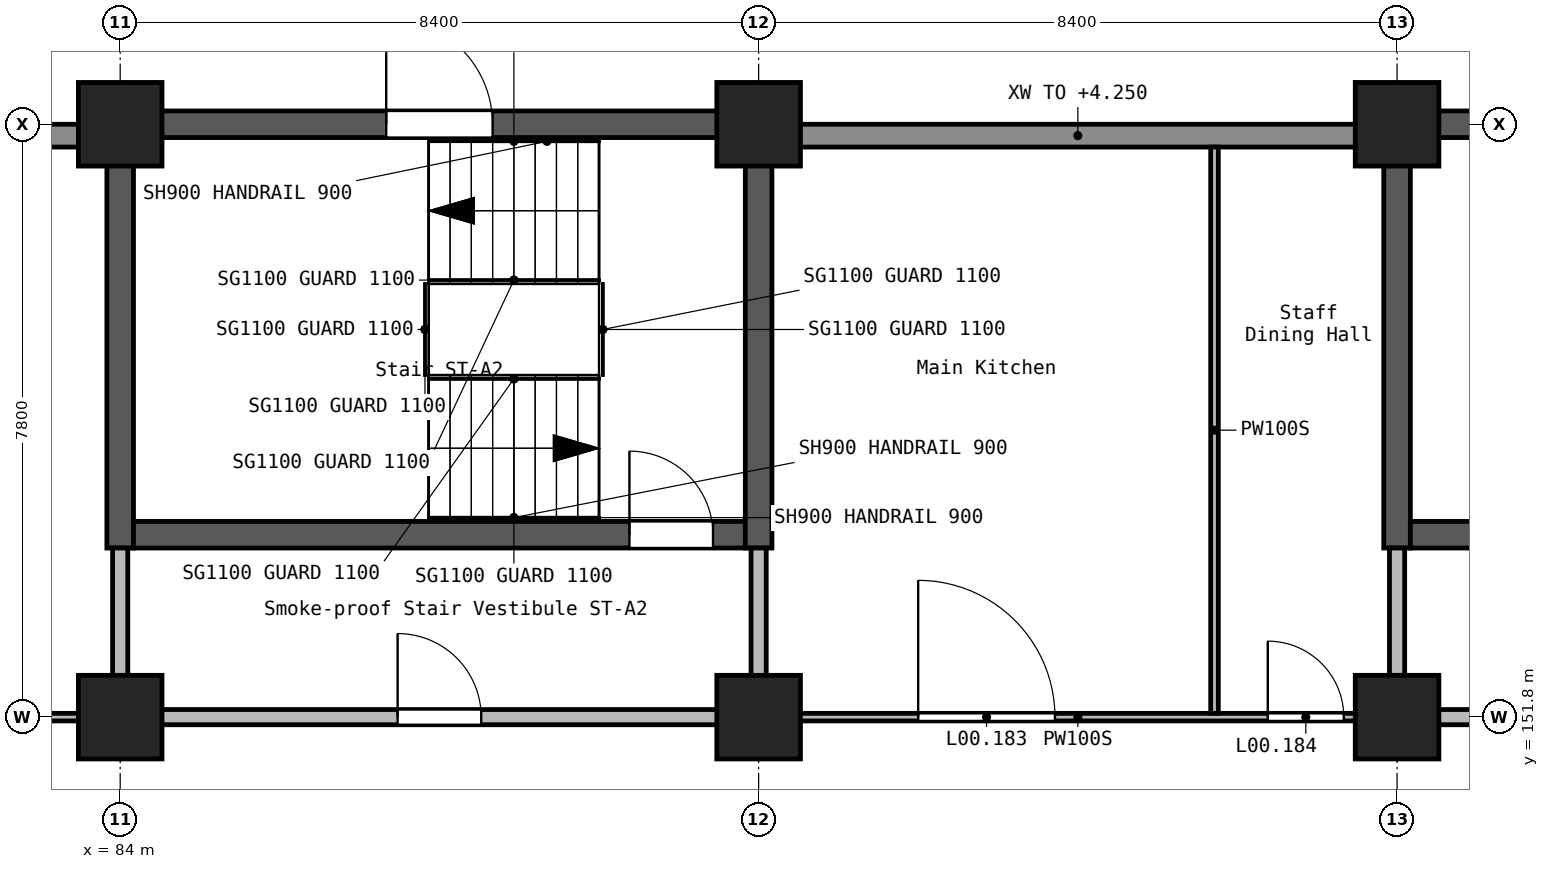
"""IFC4 building model, lengths in metres.
Left out: names, types, materials, properties, quantities, classifications, styles, units other than length and angle.
Written with IfcOpenShell. Run it as: python <this file> out.ifc"""

import sys

from ifc_helpers import new_model, si_unit, direction, frame, frame_2d, origin, origin_2d, place, context, subcontext, project, spatial, rectangle, extrude, element, fill, save


model = new_model("IFC4")
c1 = context("Model", 3, precision=1e-05, world=origin(), true_north=direction((0.0, 1.0)))
c2 = subcontext(c1, "Body", "Model", "MODEL_VIEW")
j1 = project(units=[si_unit("LENGTHUNIT", "METRE"), si_unit("PLANEANGLEUNIT", "RADIAN")], contexts=[c1])
p1 = place(None, origin())
s1 = spatial("IfcSite", under=j1, at=p1, CompositionType="ELEMENT")
p2 = place(p1, origin())
s2 = spatial("IfcBuilding", under=s1, at=p2, CompositionType="ELEMENT")
p3 = place(p2, origin())
s3 = spatial("IfcBuildingStorey", under=s2, at=p3, CompositionType="ELEMENT", Elevation=0.0)
for number, where, z_axis, x_axis in (
    (1, (84.0, 151.8, -0.3), (0.0, 0.0, 1.0), (1.0, 0.0, 0.0)),
    (2, (84.0, 159.6, -0.3), (0.0, 0.0, 1.0), (1.0, 0.0, 0.0)),
    (3, (92.4, 151.8, -0.3), (0.0, 0.0, 1.0), (1.0, 0.0, 0.0)),
    (4, (92.4, 159.6, -0.3), (0.0, 0.0, 1.0), (1.0, 0.0, 0.0)),
    (5, (100.8, 151.8, -0.3), (0.0, 0.0, 1.0), (1.0, 0.0, 0.0)),
    (6, (100.8, 159.6, -0.3), (0.0, 0.0, 1.0), (1.0, 0.0, 0.0)),
):
    element("IfcColumn", number, at=place(p3, frame(where, z_axis=z_axis, x_axis=x_axis)), inside=s3, PredefinedType="COLUMN", context=c2, shape_type="SweptSolid", body=[
        extrude(rectangle(XDim=1.1, YDim=1.1, at=origin_2d()), origin(), (0.0, 0.0, 1.0), 5.7),
    ])
p4 = place(p3, frame((83.825, 159.6, -0.3), z_axis=(0.0, 0.0, 1.0), x_axis=(1.0, 0.0, 0.0)))
e7 = element("IfcWall", 7, at=p4, inside=s3, PredefinedType="SHEAR", context=c2, shape_type="SweptSolid", body=[
    extrude(rectangle(XDim=8.4, YDim=0.35, at=frame_2d((4.2, 0.0))), origin(), (0.0, 0.0, 1.0), 5.7),
])
p5 = place(p4, frame((3.675, 0.0, 0.3)))
e8 = element("IfcOpeningElement", 8, at=p5, cuts=e7, PredefinedType="OPENING", context=c2, shape_type="SweptSolid", body=[
    extrude(rectangle(XDim=1.4, YDim=2.1, at=frame_2d((0.7, 1.05))), frame((0.0, 0.185, 0.0), z_axis=(0.0, -1.0, 0.0), x_axis=(1.0, 0.0, 0.0)), (0.0, 0.0, 1.0), 0.37),
])
p6 = place(p3, frame((84.0, 154.025, -0.3), z_axis=(0.0, 0.0, 1.0), x_axis=(0.0, 1.0, 0.0)))
e9 = element("IfcWall", 9, at=p6, inside=s3, PredefinedType="SHEAR", context=c2, shape_type="SweptSolid", body=[
    extrude(rectangle(XDim=5.4, YDim=0.35, at=frame_2d((2.7, 0.0))), origin(), (0.0, 0.0, 1.0), 5.7),
])
p7 = place(p3, frame((84.175, 154.2, -0.3), z_axis=(0.0, 0.0, 1.0), x_axis=(1.0, 0.0, 0.0)))
e10 = element("IfcWall", 10, at=p7, inside=s3, PredefinedType="SHEAR", context=c2, shape_type="SweptSolid", body=[
    extrude(rectangle(XDim=8.05, YDim=0.35, at=frame_2d((4.025, 0.0))), origin(), (0.0, 0.0, 1.0), 5.7),
])
p8 = place(p7, frame((6.525, 0.0, 0.3)))
e11 = element("IfcOpeningElement", 11, at=p8, cuts=e10, PredefinedType="OPENING", context=c2, shape_type="SweptSolid", body=[
    extrude(rectangle(XDim=1.1, YDim=2.1, at=frame_2d((0.55, 1.05))), frame((0.0, 0.185, 0.0), z_axis=(0.0, -1.0, 0.0), x_axis=(1.0, 0.0, 0.0)), (0.0, 0.0, 1.0), 0.37),
])
p9 = place(p3, frame((92.4, 154.025, -0.3), z_axis=(0.0, 0.0, 1.0), x_axis=(0.0, 1.0, 0.0)))
e12 = element("IfcWall", 12, at=p9, inside=s3, PredefinedType="SHEAR", context=c2, shape_type="SweptSolid", body=[
    extrude(rectangle(XDim=5.75, YDim=0.35, at=frame_2d((2.875, 0.0))), origin(), (0.0, 0.0, 1.0), 5.7),
])
p10 = place(p3, frame((100.625, 159.6, -0.3), z_axis=(0.0, 0.0, 1.0), x_axis=(1.0, 0.0, 0.0)))
e13 = element("IfcWall", 13, at=p10, inside=s3, PredefinedType="SHEAR", context=c2, shape_type="SweptSolid", body=[
    extrude(rectangle(XDim=8.4, YDim=0.35, at=frame_2d((4.2, 0.0))), origin(), (0.0, 0.0, 1.0), 5.7),
])
p11 = place(p10, frame((3.675, 0.0, 0.3)))
e14 = element("IfcOpeningElement", 14, at=p11, cuts=e13, PredefinedType="OPENING", context=c2, shape_type="SweptSolid", body=[
    extrude(rectangle(XDim=1.4, YDim=2.1, at=frame_2d((0.7, 1.05))), frame((0.0, 0.185, 0.0), z_axis=(0.0, -1.0, 0.0), x_axis=(1.0, 0.0, 0.0)), (0.0, 0.0, 1.0), 0.37),
])
p12 = place(p3, frame((100.8, 154.025, -0.3), z_axis=(0.0, 0.0, 1.0), x_axis=(0.0, 1.0, 0.0)))
e15 = element("IfcWall", 15, at=p12, inside=s3, PredefinedType="SHEAR", context=c2, shape_type="SweptSolid", body=[
    extrude(rectangle(XDim=5.4, YDim=0.35, at=frame_2d((2.7, 0.0))), origin(), (0.0, 0.0, 1.0), 5.7),
])
p13 = place(p3, frame((100.975, 154.2, -0.3), z_axis=(0.0, 0.0, 1.0), x_axis=(1.0, 0.0, 0.0)))
e16 = element("IfcWall", 16, at=p13, inside=s3, PredefinedType="SHEAR", context=c2, shape_type="SweptSolid", body=[
    extrude(rectangle(XDim=8.05, YDim=0.35, at=frame_2d((4.025, 0.0))), origin(), (0.0, 0.0, 1.0), 5.7),
])
p14 = place(p13, frame((6.525, 0.0, 0.3)))
e17 = element("IfcOpeningElement", 17, at=p14, cuts=e16, PredefinedType="OPENING", context=c2, shape_type="SweptSolid", body=[
    extrude(rectangle(XDim=1.1, YDim=2.1, at=frame_2d((0.55, 1.05))), frame((0.0, 0.185, 0.0), z_axis=(0.0, -1.0, 0.0), x_axis=(1.0, 0.0, 0.0)), (0.0, 0.0, 1.0), 0.37),
])
p15 = place(p3, frame((100.3, 159.45, 0.0), z_axis=(0.0, 0.0, 1.0), x_axis=(-1.0, 0.0, 0.0)))
e18 = element("IfcWall", 18, at=p15, inside=s3, PredefinedType="STANDARD", context=c2, shape_type="SweptSolid", body=[
    extrude(rectangle(XDim=7.4, YDim=0.3, at=frame_2d((3.7, 0.0))), origin(), (0.0, 0.0, 1.0), 4.25),
])
p16 = place(p3, frame((83.5, 159.45, 0.0), z_axis=(0.0, 0.0, 1.0), x_axis=(-1.0, 0.0, 0.0)))
e19 = element("IfcWall", 19, at=p16, inside=s3, PredefinedType="STANDARD", context=c2, shape_type="SweptSolid", body=[
    extrude(rectangle(XDim=7.4, YDim=0.3, at=frame_2d((3.7, 0.0))), origin(), (0.0, 0.0, 1.0), 4.25),
])
p17 = place(p3, frame((84.5, 151.8, 0.0), z_axis=(0.0, 0.0, 1.0), x_axis=(1.0, 0.0, 0.0)))
e20 = element("IfcWall", 20, at=p17, inside=s3, PredefinedType="SOLIDWALL", context=c2, shape_type="SweptSolid", body=[
    extrude(rectangle(XDim=7.4, YDim=0.2, at=frame_2d((3.7, 0.0))), origin(), (0.0, 0.0, 1.0), 5.05),
])
p18 = place(p17, frame((3.15, 0.0, 0.0)))
e21 = element("IfcOpeningElement", 21, at=p18, cuts=e20, PredefinedType="OPENING", context=c2, shape_type="SweptSolid", body=[
    extrude(rectangle(XDim=1.1, YDim=2.1, at=frame_2d((0.55, 1.05))), frame((0.0, 0.11, 0.0), z_axis=(0.0, -1.0, 0.0), x_axis=(1.0, 0.0, 0.0)), (0.0, 0.0, 1.0), 0.22),
])
p19 = place(p3, frame((101.3, 151.8, 0.0), z_axis=(0.0, 0.0, 1.0), x_axis=(1.0, 0.0, 0.0)))
e22 = element("IfcWall", 22, at=p19, inside=s3, PredefinedType="SOLIDWALL", context=c2, shape_type="SweptSolid", body=[
    extrude(rectangle(XDim=7.4, YDim=0.2, at=frame_2d((3.7, 0.0))), origin(), (0.0, 0.0, 1.0), 5.05),
])
p20 = place(p19, frame((3.15, 0.0, 0.0)))
e23 = element("IfcOpeningElement", 23, at=p20, cuts=e22, PredefinedType="OPENING", context=c2, shape_type="SweptSolid", body=[
    extrude(rectangle(XDim=1.1, YDim=2.1, at=frame_2d((0.55, 1.05))), frame((0.0, 0.11, 0.0), z_axis=(0.0, -1.0, 0.0), x_axis=(1.0, 0.0, 0.0)), (0.0, 0.0, 1.0), 0.22),
])
for number, where, z_axis, x_axis in (
    (24, (84.0, 152.3, 0.0), (0.0, 0.0, 1.0), (0.0, 1.0, 0.0)),
    (25, (92.4, 152.3, 0.0), (0.0, 0.0, 1.0), (0.0, 1.0, 0.0)),
    (26, (100.8, 152.3, 0.0), (0.0, 0.0, 1.0), (0.0, 1.0, 0.0)),
):
    element("IfcWall", number, at=place(p3, frame(where, z_axis=z_axis, x_axis=x_axis)), inside=s3, PredefinedType="SOLIDWALL", context=c2, shape_type="SweptSolid", body=[
        extrude(rectangle(XDim=1.725, YDim=0.2, at=frame_2d((0.862, 0.0))), origin(), (0.0, 0.0, 1.0), 5.05),
    ])
p21 = place(p3, frame((76.1, 151.8, 0.0), z_axis=(0.0, 0.0, 1.0), x_axis=(1.0, 0.0, 0.0)))
e27 = element("IfcWall", 27, at=p21, inside=s3, PredefinedType="PARTITIONING", context=c2, shape_type="SweptSolid", body=[
    extrude(rectangle(XDim=7.4, YDim=0.1, at=frame_2d((3.7, 0.0))), origin(), (0.0, 0.0, 1.0), 5.05),
])
p22 = place(p21, frame((0.199, 0.0, 0.0)))
e28 = element("IfcOpeningElement", 28, at=p22, cuts=e27, PredefinedType="OPENING", context=c2, shape_type="SweptSolid", body=[
    extrude(rectangle(XDim=1.8, YDim=2.1, at=frame_2d((0.9, 1.05))), frame((0.0, 0.06, 0.0), z_axis=(0.0, -1.0, 0.0), x_axis=(1.0, 0.0, 0.0)), (0.0, 0.0, 1.0), 0.12),
])
p23 = place(p21, frame((4.299, 0.0, 0.0)))
e29 = element("IfcOpeningElement", 29, at=p23, cuts=e27, PredefinedType="OPENING", context=c2, shape_type="SweptSolid", body=[
    extrude(rectangle(XDim=1.8, YDim=2.1, at=frame_2d((0.9, 1.05))), frame((0.0, 0.06, 0.0), z_axis=(0.0, -1.0, 0.0), x_axis=(1.0, 0.0, 0.0)), (0.0, 0.0, 1.0), 0.12),
])
p24 = place(p3, frame((92.9, 151.8, 0.0), z_axis=(0.0, 0.0, 1.0), x_axis=(1.0, 0.0, 0.0)))
e30 = element("IfcWall", 30, at=p24, inside=s3, PredefinedType="PARTITIONING", context=c2, shape_type="SweptSolid", body=[
    extrude(rectangle(XDim=7.4, YDim=0.1, at=frame_2d((3.7, 0.0))), origin(), (0.0, 0.0, 1.0), 5.05),
])
p25 = place(p24, frame((1.599, 0.0, 0.0)))
e31 = element("IfcOpeningElement", 31, at=p25, cuts=e30, PredefinedType="OPENING", context=c2, shape_type="SweptSolid", body=[
    extrude(rectangle(XDim=1.8, YDim=2.1, at=frame_2d((0.9, 1.05))), frame((0.0, 0.06, 0.0), z_axis=(0.0, -1.0, 0.0), x_axis=(1.0, 0.0, 0.0)), (0.0, 0.0, 1.0), 0.12),
])
p26 = place(p24, frame((6.199, 0.0, 0.0)))
e32 = element("IfcOpeningElement", 32, at=p26, cuts=e30, PredefinedType="OPENING", context=c2, shape_type="SweptSolid", body=[
    extrude(rectangle(XDim=1.0, YDim=2.1, at=frame_2d((0.5, 1.05))), frame((0.0, 0.06, 0.0), z_axis=(0.0, -1.0, 0.0), x_axis=(1.0, 0.0, 0.0)), (0.0, 0.0, 1.0), 0.12),
])
p27 = place(p3, frame((98.398, 151.85, 0.0), z_axis=(0.0, 0.0, 1.0), x_axis=(0.0, 1.0, 0.0)))
e33 = element("IfcWall", 33, at=p27, inside=s3, PredefinedType="PARTITIONING", context=c2, shape_type="SweptSolid", body=[
    extrude(rectangle(XDim=7.45, YDim=0.1, at=frame_2d((3.725, 0.0))), origin(), (0.0, 0.0, 1.0), 5.05),
])
p28 = place(p5, origin())
e34 = element("IfcDoor", 34, at=p28, inside=s3, OperationType="SINGLE_SWING_LEFT", PredefinedType="DOOR", context=c2, shape_type="SweptSolid", body=[
    extrude(rectangle(XDim=1.4, YDim=2.1, at=frame_2d((0.7, 1.05))), frame((0.0, 0.025, 0.0), z_axis=(0.0, -1.0, 0.0), x_axis=(1.0, 0.0, 0.0)), (0.0, 0.0, 1.0), 0.05),
])
fill(e8, e34)
p29 = place(p8, origin())
e35 = element("IfcDoor", 35, at=p29, inside=s3, OperationType="SINGLE_SWING_RIGHT", PredefinedType="DOOR", context=c2, shape_type="SweptSolid", body=[
    extrude(rectangle(XDim=1.1, YDim=2.1, at=frame_2d((0.55, 1.05))), frame((0.0, 0.025, 0.0), z_axis=(0.0, -1.0, 0.0), x_axis=(1.0, 0.0, 0.0)), (0.0, 0.0, 1.0), 0.05),
])
fill(e11, e35)
p30 = place(p18, origin())
e36 = element("IfcDoor", 36, at=p30, inside=s3, OperationType="SINGLE_SWING_RIGHT", PredefinedType="DOOR", context=c2, shape_type="SweptSolid", body=[
    extrude(rectangle(XDim=1.1, YDim=2.1, at=frame_2d((0.55, 1.05))), frame((0.0, 0.025, 0.0), z_axis=(0.0, -1.0, 0.0), x_axis=(1.0, 0.0, 0.0)), (0.0, 0.0, 1.0), 0.05),
])
fill(e21, e36)
p31 = place(p25, origin())
e37 = element("IfcDoor", 37, at=p31, inside=s3, OperationType="DOUBLE_DOOR_SINGLE_SWING", PredefinedType="DOOR", context=c2, shape_type="SweptSolid", body=[
    extrude(rectangle(XDim=1.8, YDim=2.1, at=frame_2d((0.9, 1.05))), frame((0.0, 0.025, 0.0), z_axis=(0.0, -1.0, 0.0), x_axis=(1.0, 0.0, 0.0)), (0.0, 0.0, 1.0), 0.05),
])
fill(e31, e37)
p32 = place(p26, origin())
e38 = element("IfcDoor", 38, at=p32, inside=s3, OperationType="SINGLE_SWING_RIGHT", PredefinedType="DOOR", context=c2, shape_type="SweptSolid", body=[
    extrude(rectangle(XDim=1.0, YDim=2.1, at=frame_2d((0.5, 1.05))), frame((0.0, 0.025, 0.0), z_axis=(0.0, -1.0, 0.0), x_axis=(1.0, 0.0, 0.0)), (0.0, 0.0, 1.0), 0.05),
])
fill(e32, e38)
save(model, sys.argv[1])
